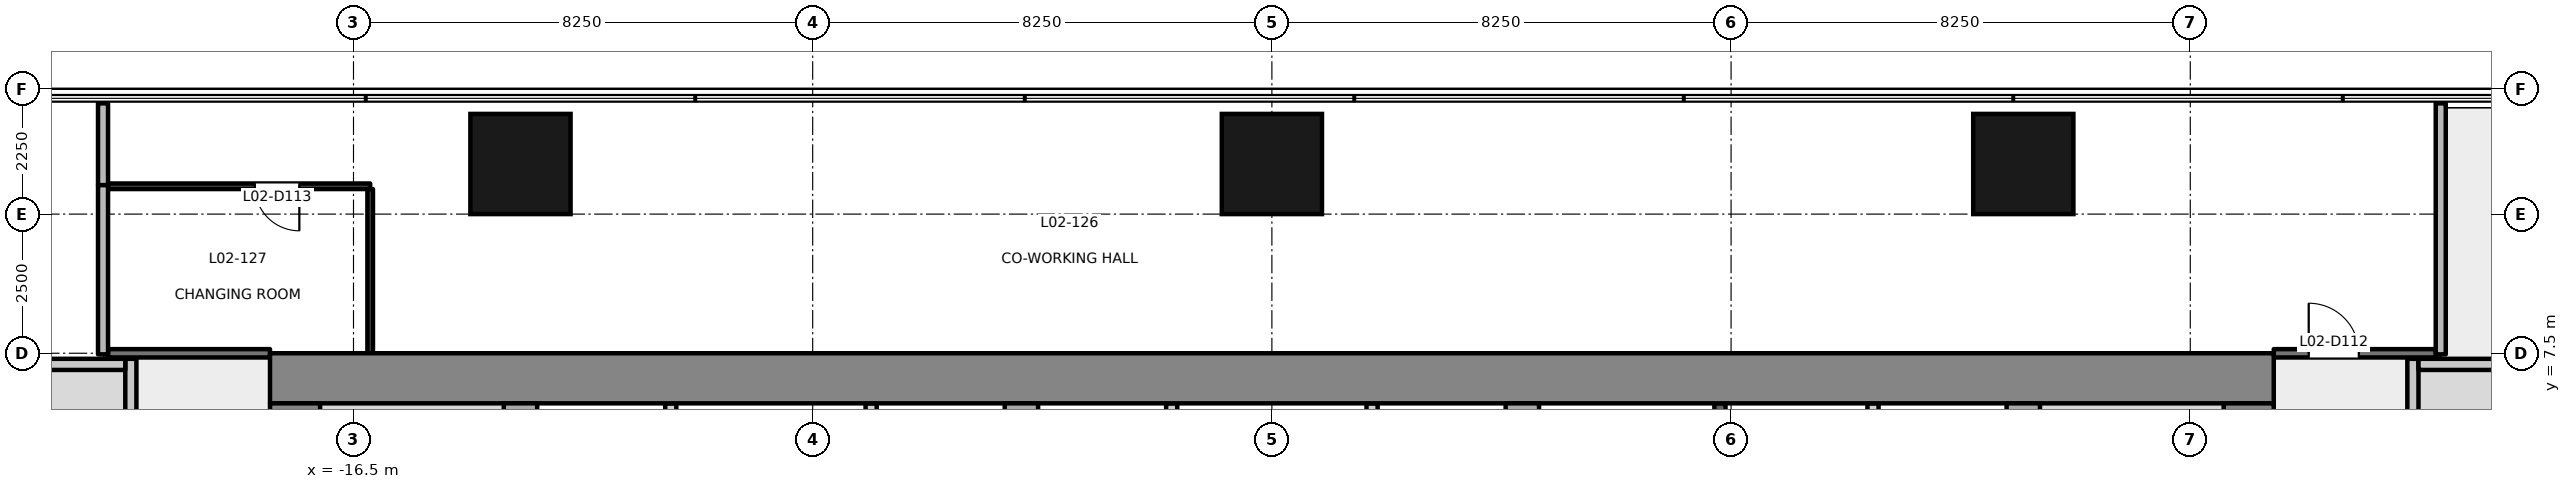
"""IFC4 building model, lengths in metres.
Left out: names, types, materials, properties, quantities, classifications, styles, units other than length and angle.
Written with IfcOpenShell. Run it as: python <this file> out.ifc"""

import sys

from ifc_helpers import new_model, si_unit, direction, frame, frame_2d, origin, origin_2d, place, context, subcontext, project, spatial, rectangle, extrude, element, fill, save


model = new_model("IFC4")
c1 = context("Model", 3, precision=1e-05, world=origin(), true_north=direction((0.0, 1.0)))
c2 = subcontext(c1, "Body", "Model", "MODEL_VIEW")
j1 = project(units=[si_unit("LENGTHUNIT", "METRE"), si_unit("PLANEANGLEUNIT", "RADIAN")], contexts=[c1])
p1 = place(None, origin())
s1 = spatial("IfcSite", under=j1, at=p1, CompositionType="ELEMENT")
p2 = place(p1, origin())
s2 = spatial("IfcBuilding", under=s1, at=p2, CompositionType="ELEMENT")
p3 = place(p2, frame((0.0, 0.0, 12.6)))
s3 = spatial("IfcBuildingStorey", under=s2, at=p3, CompositionType="ELEMENT", Elevation=12.6)
for number, where, z_axis, x_axis in (
    (1, (-13.5, 10.9, -0.2), (0.0, 0.0, 1.0), (1.0, 0.0, 0.0)),
    (2, (0.0, 10.9, -0.2), (0.0, 0.0, 1.0), (1.0, 0.0, 0.0)),
    (3, (13.5, 10.9, -0.2), (0.0, 0.0, 1.0), (1.0, 0.0, 0.0)),
):
    element("IfcColumn", number, at=place(p3, frame(where, z_axis=z_axis, x_axis=x_axis)), inside=s3, PredefinedType="COLUMN", context=c2, shape_type="SweptSolid", body=[
        extrude(rectangle(XDim=1.8, YDim=1.8, at=origin_2d()), origin(), (0.0, 0.0, 1.0), 4.8),
    ])
p4 = place(p3, frame((-18.0, 7.05, -0.2), z_axis=(0.0, 0.0, 1.0), x_axis=(1.0, 0.0, 0.0)))
e4 = element("IfcWall", 4, at=p4, inside=s3, PredefinedType="SHEAR", context=c2, shape_type="SweptSolid", body=[
    extrude(rectangle(XDim=36.0, YDim=0.9, at=frame_2d((18.0, 0.0))), origin(), (0.0, 0.0, 1.0), 4.8),
])
p5 = place(p3, frame((-17.55, -6.6, -0.2), z_axis=(0.0, 0.0, 1.0), x_axis=(0.0, 1.0, 0.0)))
e5 = element("IfcWall", 5, at=p5, inside=s3, PredefinedType="SHEAR", context=c2, shape_type="SweptSolid", body=[
    extrude(rectangle(XDim=13.2, YDim=0.9, at=frame_2d((6.6, 0.0))), origin(), (0.0, 0.0, 1.0), 4.8),
])
p6 = place(p5, frame((4.55, 0.0, 0.2)))
e6 = element("IfcOpeningElement", 6, at=p6, cuts=e5, PredefinedType="OPENING", context=c2, shape_type="SweptSolid", body=[
    extrude(rectangle(XDim=1.2, YDim=2.1, at=frame_2d((0.6, 1.05))), frame((0.0, 0.46, 0.0), z_axis=(0.0, -1.0, 0.0), x_axis=(1.0, 0.0, 0.0)), (0.0, 0.0, 1.0), 0.921),
])
p7 = place(p3, frame((17.55, -6.6, -0.2), z_axis=(0.0, 0.0, 1.0), x_axis=(0.0, 1.0, 0.0)))
e7 = element("IfcWall", 7, at=p7, inside=s3, PredefinedType="SHEAR", context=c2, shape_type="SweptSolid", body=[
    extrude(rectangle(XDim=13.2, YDim=0.9, at=frame_2d((6.6, 0.0))), origin(), (0.0, 0.0, 1.0), 4.8),
])
p8 = place(p7, frame((4.55, 0.0, 0.2)))
e8 = element("IfcOpeningElement", 8, at=p8, cuts=e7, PredefinedType="OPENING", context=c2, shape_type="SweptSolid", body=[
    extrude(rectangle(XDim=1.2, YDim=2.1, at=frame_2d((0.6, 1.05))), frame((0.0, 0.46, 0.0), z_axis=(0.0, -1.0, 0.0), x_axis=(1.0, 0.0, 0.0)), (0.0, 0.0, 1.0), 0.921),
])
for number, where, z_axis, x_axis in (
    (9, (-13.5, -6.6, -0.2), (0.0, 0.0, 1.0), (0.0, 1.0, 0.0)),
    (10, (-4.5, -6.6, -0.2), (0.0, 0.0, 1.0), (0.0, 1.0, 0.0)),
    (11, (4.5, -6.6, -0.2), (0.0, 0.0, 1.0), (0.0, 1.0, 0.0)),
    (12, (13.5, -6.6, -0.2), (0.0, 0.0, 1.0), (0.0, 1.0, 0.0)),
):
    element("IfcWall", number, at=place(p3, frame(where, z_axis=z_axis, x_axis=x_axis)), inside=s3, PredefinedType="SHEAR", context=c2, shape_type="SweptSolid", body=[
        extrude(rectangle(XDim=13.2, YDim=0.6, at=frame_2d((6.6, 0.0))), origin(), (0.0, 0.0, 1.0), 4.8),
    ])
p9 = place(p3, frame((-10.8, -6.6, 0.0), z_axis=(0.0, 0.0, 1.0), x_axis=(0.0, 1.0, 0.0)))
e13 = element("IfcWall", 13, at=p9, inside=s3, PredefinedType="PARTITIONING", context=c2, shape_type="SweptSolid", body=[
    extrude(rectangle(XDim=13.2, YDim=0.2, at=frame_2d((6.6, 0.0))), origin(), (0.0, 0.0, 1.0), 4.6),
])
p10 = place(p9, frame((0.55, 0.0, 0.0)))
e14 = element("IfcOpeningElement", 14, at=p10, cuts=e13, PredefinedType="OPENING", context=c2, shape_type="SweptSolid", body=[
    extrude(rectangle(XDim=0.9, YDim=2.1, at=frame_2d((0.45, 1.05))), frame((0.0, 0.111, 0.0), z_axis=(0.0, -1.0, 0.0), x_axis=(1.0, 0.0, 0.0)), (0.0, 0.0, 1.0), 0.221),
])
p11 = place(p9, frame((2.9, 0.0, 0.0)))
e15 = element("IfcOpeningElement", 15, at=p11, cuts=e13, PredefinedType="OPENING", context=c2, shape_type="SweptSolid", body=[
    extrude(rectangle(XDim=1.2, YDim=2.1, at=frame_2d((0.6, 1.05))), frame((0.0, 0.111, 0.0), z_axis=(0.0, -1.0, 0.0), x_axis=(1.0, 0.0, 0.0)), (0.0, 0.0, 1.0), 0.221),
])
p12 = place(p9, frame((5.7, 0.0, 0.0)))
e16 = element("IfcOpeningElement", 16, at=p12, cuts=e13, PredefinedType="OPENING", context=c2, shape_type="SweptSolid", body=[
    extrude(rectangle(XDim=1.2, YDim=2.1, at=frame_2d((0.6, 1.05))), frame((0.0, 0.111, 0.0), z_axis=(0.0, -1.0, 0.0), x_axis=(1.0, 0.0, 0.0)), (0.0, 0.0, 1.0), 0.221),
])
p13 = place(p9, frame((8.5, 0.0, 0.0)))
e17 = element("IfcOpeningElement", 17, at=p13, cuts=e13, PredefinedType="OPENING", context=c2, shape_type="SweptSolid", body=[
    extrude(rectangle(XDim=1.2, YDim=2.1, at=frame_2d((0.6, 1.05))), frame((0.0, 0.111, 0.0), z_axis=(0.0, -1.0, 0.0), x_axis=(1.0, 0.0, 0.0)), (0.0, 0.0, 1.0), 0.221),
])
p14 = place(p9, frame((11.3, 0.0, 0.0)))
e18 = element("IfcOpeningElement", 18, at=p14, cuts=e13, PredefinedType="OPENING", context=c2, shape_type="SweptSolid", body=[
    extrude(rectangle(XDim=1.2, YDim=2.1, at=frame_2d((0.6, 1.05))), frame((0.0, 0.111, 0.0), z_axis=(0.0, -1.0, 0.0), x_axis=(1.0, 0.0, 0.0)), (0.0, 0.0, 1.0), 0.221),
])
p15 = place(p3, frame((-7.2, -6.6, 0.0), z_axis=(0.0, 0.0, 1.0), x_axis=(0.0, 1.0, 0.0)))
e19 = element("IfcWall", 19, at=p15, inside=s3, PredefinedType="PARTITIONING", context=c2, shape_type="SweptSolid", body=[
    extrude(rectangle(XDim=13.2, YDim=0.2, at=frame_2d((6.6, 0.0))), origin(), (0.0, 0.0, 1.0), 4.6),
])
p16 = place(p15, frame((0.55, 0.0, 0.0)))
e20 = element("IfcOpeningElement", 20, at=p16, cuts=e19, PredefinedType="OPENING", context=c2, shape_type="SweptSolid", body=[
    extrude(rectangle(XDim=0.9, YDim=2.1, at=frame_2d((0.45, 1.05))), frame((0.0, 0.111, 0.0), z_axis=(0.0, -1.0, 0.0), x_axis=(1.0, 0.0, 0.0)), (0.0, 0.0, 1.0), 0.221),
])
p17 = place(p15, frame((2.9, 0.0, 0.0)))
e21 = element("IfcOpeningElement", 21, at=p17, cuts=e19, PredefinedType="OPENING", context=c2, shape_type="SweptSolid", body=[
    extrude(rectangle(XDim=1.2, YDim=2.1, at=frame_2d((0.6, 1.05))), frame((0.0, 0.111, 0.0), z_axis=(0.0, -1.0, 0.0), x_axis=(1.0, 0.0, 0.0)), (0.0, 0.0, 1.0), 0.221),
])
p18 = place(p15, frame((5.7, 0.0, 0.0)))
e22 = element("IfcOpeningElement", 22, at=p18, cuts=e19, PredefinedType="OPENING", context=c2, shape_type="SweptSolid", body=[
    extrude(rectangle(XDim=1.2, YDim=2.1, at=frame_2d((0.6, 1.05))), frame((0.0, 0.111, 0.0), z_axis=(0.0, -1.0, 0.0), x_axis=(1.0, 0.0, 0.0)), (0.0, 0.0, 1.0), 0.221),
])
p19 = place(p15, frame((8.5, 0.0, 0.0)))
e23 = element("IfcOpeningElement", 23, at=p19, cuts=e19, PredefinedType="OPENING", context=c2, shape_type="SweptSolid", body=[
    extrude(rectangle(XDim=1.2, YDim=2.1, at=frame_2d((0.6, 1.05))), frame((0.0, 0.111, 0.0), z_axis=(0.0, -1.0, 0.0), x_axis=(1.0, 0.0, 0.0)), (0.0, 0.0, 1.0), 0.221),
])
p20 = place(p15, frame((11.3, 0.0, 0.0)))
e24 = element("IfcOpeningElement", 24, at=p20, cuts=e19, PredefinedType="OPENING", context=c2, shape_type="SweptSolid", body=[
    extrude(rectangle(XDim=1.2, YDim=2.1, at=frame_2d((0.6, 1.05))), frame((0.0, 0.111, 0.0), z_axis=(0.0, -1.0, 0.0), x_axis=(1.0, 0.0, 0.0)), (0.0, 0.0, 1.0), 0.221),
])
p21 = place(p3, frame((-1.8, -6.6, 0.0), z_axis=(0.0, 0.0, 1.0), x_axis=(0.0, 1.0, 0.0)))
e25 = element("IfcWall", 25, at=p21, inside=s3, PredefinedType="PARTITIONING", context=c2, shape_type="SweptSolid", body=[
    extrude(rectangle(XDim=13.2, YDim=0.2, at=frame_2d((6.6, 0.0))), origin(), (0.0, 0.0, 1.0), 4.6),
])
p22 = place(p21, frame((0.55, 0.0, 0.0)))
e26 = element("IfcOpeningElement", 26, at=p22, cuts=e25, PredefinedType="OPENING", context=c2, shape_type="SweptSolid", body=[
    extrude(rectangle(XDim=0.9, YDim=2.1, at=frame_2d((0.45, 1.05))), frame((0.0, 0.111, 0.0), z_axis=(0.0, -1.0, 0.0), x_axis=(1.0, 0.0, 0.0)), (0.0, 0.0, 1.0), 0.221),
])
p23 = place(p3, frame((1.8, -6.6, 0.0), z_axis=(0.0, 0.0, 1.0), x_axis=(0.0, 1.0, 0.0)))
e27 = element("IfcWall", 27, at=p23, inside=s3, PredefinedType="PARTITIONING", context=c2, shape_type="SweptSolid", body=[
    extrude(rectangle(XDim=13.2, YDim=0.2, at=frame_2d((6.6, 0.0))), origin(), (0.0, 0.0, 1.0), 4.6),
])
p24 = place(p23, frame((0.55, 0.0, 0.0)))
e28 = element("IfcOpeningElement", 28, at=p24, cuts=e27, PredefinedType="OPENING", context=c2, shape_type="SweptSolid", body=[
    extrude(rectangle(XDim=0.9, YDim=2.1, at=frame_2d((0.45, 1.05))), frame((0.0, 0.111, 0.0), z_axis=(0.0, -1.0, 0.0), x_axis=(1.0, 0.0, 0.0)), (0.0, 0.0, 1.0), 0.221),
])
p25 = place(p3, frame((8.05, -6.6, 0.0), z_axis=(0.0, 0.0, 1.0), x_axis=(0.0, 1.0, 0.0)))
e29 = element("IfcWall", 29, at=p25, inside=s3, PredefinedType="PARTITIONING", context=c2, shape_type="SweptSolid", body=[
    extrude(rectangle(XDim=13.2, YDim=0.2, at=frame_2d((6.6, 0.0))), origin(), (0.0, 0.0, 1.0), 4.6),
])
p26 = place(p25, frame((1.386, 0.0, 0.0)))
e30 = element("IfcOpeningElement", 30, at=p26, cuts=e29, PredefinedType="OPENING", context=c2, shape_type="SweptSolid", body=[
    extrude(rectangle(XDim=0.9, YDim=2.1, at=frame_2d((0.45, 1.05))), frame((0.0, 0.111, 0.0), z_axis=(0.0, -1.0, 0.0), x_axis=(1.0, 0.0, 0.0)), (0.0, 0.0, 1.0), 0.221),
])
p27 = place(p25, frame((4.786, 0.0, 0.0)))
e31 = element("IfcOpeningElement", 31, at=p27, cuts=e29, PredefinedType="OPENING", context=c2, shape_type="SweptSolid", body=[
    extrude(rectangle(XDim=0.9, YDim=2.1, at=frame_2d((0.45, 1.05))), frame((0.0, 0.111, 0.0), z_axis=(0.0, -1.0, 0.0), x_axis=(1.0, 0.0, 0.0)), (0.0, 0.0, 1.0), 0.221),
])
p28 = place(p25, frame((11.9, 0.0, 0.0)))
e32 = element("IfcOpeningElement", 32, at=p28, cuts=e29, PredefinedType="OPENING", context=c2, shape_type="SweptSolid", body=[
    extrude(rectangle(XDim=1.1, YDim=2.1, at=frame_2d((0.55, 1.05))), frame((0.0, 0.111, 0.0), z_axis=(0.0, -1.0, 0.0), x_axis=(1.0, 0.0, 0.0)), (0.0, 0.0, 1.0), 0.221),
])
p29 = place(p3, frame((10.8, -6.6, 0.0), z_axis=(0.0, 0.0, 1.0), x_axis=(0.0, 1.0, 0.0)))
e33 = element("IfcWall", 33, at=p29, inside=s3, PredefinedType="PARTITIONING", context=c2, shape_type="SweptSolid", body=[
    extrude(rectangle(XDim=13.2, YDim=0.2, at=frame_2d((6.6, 0.0))), origin(), (0.0, 0.0, 1.0), 4.6),
])
p30 = place(p29, frame((0.7, 0.0, 0.0)))
e34 = element("IfcOpeningElement", 34, at=p30, cuts=e33, PredefinedType="OPENING", context=c2, shape_type="SweptSolid", body=[
    extrude(rectangle(XDim=1.2, YDim=2.1, at=frame_2d((0.6, 1.05))), frame((0.0, 0.111, 0.0), z_axis=(0.0, -1.0, 0.0), x_axis=(1.0, 0.0, 0.0)), (0.0, 0.0, 1.0), 0.221),
])
p31 = place(p29, frame((8.742, 0.0, 0.0)))
e35 = element("IfcOpeningElement", 35, at=p31, cuts=e33, PredefinedType="OPENING", context=c2, shape_type="SweptSolid", body=[
    extrude(rectangle(XDim=0.9, YDim=2.1, at=frame_2d((0.45, 1.05))), frame((0.0, 0.111, 0.0), z_axis=(0.0, -1.0, 0.0), x_axis=(1.0, 0.0, 0.0)), (0.0, 0.0, 1.0), 0.221),
])
p32 = place(p29, frame((10.326, 0.0, 0.0)))
e36 = element("IfcOpeningElement", 36, at=p32, cuts=e33, PredefinedType="OPENING", context=c2, shape_type="SweptSolid", body=[
    extrude(rectangle(XDim=0.9, YDim=2.1, at=frame_2d((0.45, 1.05))), frame((0.0, 0.111, 0.0), z_axis=(0.0, -1.0, 0.0), x_axis=(1.0, 0.0, 0.0)), (0.0, 0.0, 1.0), 0.221),
])
p33 = place(p29, frame((11.934, 0.0, 0.0)))
e37 = element("IfcOpeningElement", 37, at=p33, cuts=e33, PredefinedType="OPENING", context=c2, shape_type="SweptSolid", body=[
    extrude(rectangle(XDim=0.9, YDim=2.1, at=frame_2d((0.45, 1.05))), frame((0.0, 0.111, 0.0), z_axis=(0.0, -1.0, 0.0), x_axis=(1.0, 0.0, 0.0)), (0.0, 0.0, 1.0), 0.221),
])
p34 = place(p3, frame((-20.5, 7.4, -0.2), z_axis=(0.0, 0.0, 1.0), x_axis=(0.0, -1.0, 0.0)))
e38 = element("IfcWall", 38, at=p34, inside=s3, PredefinedType="SHEAR", context=c2, shape_type="SweptSolid", body=[
    extrude(rectangle(XDim=7.4, YDim=0.2, at=frame_2d((3.7, 0.0))), origin(), (0.0, 0.0, 1.0), 4.8),
])
p35 = place(p34, frame((5.375, 0.0, 0.2)))
e39 = element("IfcOpeningElement", 39, at=p35, cuts=e38, PredefinedType="OPENING", context=c2, shape_type="SweptSolid", body=[
    extrude(rectangle(XDim=1.8, YDim=2.1, at=frame_2d((0.9, 1.05))), frame((0.0, 0.111, 0.0), z_axis=(0.0, -1.0, 0.0), x_axis=(1.0, 0.0, 0.0)), (0.0, 0.0, 1.0), 0.221),
])
p36 = place(p3, frame((-25.1, 7.3, -0.2), z_axis=(0.0, 0.0, 1.0), x_axis=(1.0, 0.0, 0.0)))
e40 = element("IfcWall", 40, at=p36, inside=s3, PredefinedType="SHEAR", context=c2, shape_type="SweptSolid", body=[
    extrude(rectangle(XDim=4.5, YDim=0.2, at=frame_2d((2.25, 0.0))), origin(), (0.0, 0.0, 1.0), 4.8),
])
p37 = place(p3, frame((20.5, 0.0, -0.2), z_axis=(0.0, 0.0, 1.0), x_axis=(0.0, 1.0, 0.0)))
e41 = element("IfcWall", 41, at=p37, inside=s3, PredefinedType="SHEAR", context=c2, shape_type="SweptSolid", body=[
    extrude(rectangle(XDim=7.4, YDim=0.2, at=frame_2d((3.7, 0.0))), origin(), (0.0, 0.0, 1.0), 4.8),
])
p38 = place(p37, frame((0.225, 0.0, 0.2)))
e42 = element("IfcOpeningElement", 42, at=p38, cuts=e41, PredefinedType="OPENING", context=c2, shape_type="SweptSolid", body=[
    extrude(rectangle(XDim=1.8, YDim=2.1, at=frame_2d((0.9, 1.05))), frame((0.0, 0.111, 0.0), z_axis=(0.0, -1.0, 0.0), x_axis=(1.0, 0.0, 0.0)), (0.0, 0.0, 1.0), 0.221),
])
p39 = place(p3, frame((20.6, 7.3, -0.2), z_axis=(0.0, 0.0, 1.0), x_axis=(1.0, 0.0, 0.0)))
e43 = element("IfcWall", 43, at=p39, inside=s3, PredefinedType="SHEAR", context=c2, shape_type="SweptSolid", body=[
    extrude(rectangle(XDim=4.5, YDim=0.2, at=frame_2d((2.25, 0.0))), origin(), (0.0, 0.0, 1.0), 4.8),
])
p40 = place(p3, frame((18.0, 7.499, 0.0), z_axis=(0.0, 0.0, 1.0), x_axis=(1.0, 0.0, 0.0)))
e44 = element("IfcWall", 44, at=p40, inside=s3, PredefinedType="PARTITIONING", context=c2, shape_type="SweptSolid", body=[
    extrude(rectangle(XDim=2.91, YDim=0.15, at=frame_2d((1.455, 0.0))), origin(), (0.0, 0.0, 1.0), 4.3),
])
p41 = place(p40, frame((0.628, 0.0, 0.0)))
e45 = element("IfcOpeningElement", 45, at=p41, cuts=e44, PredefinedType="OPENING", context=c2, shape_type="SweptSolid", body=[
    extrude(rectangle(XDim=0.9, YDim=2.1, at=frame_2d((0.45, 1.05))), frame((0.0, 0.085, 0.0), z_axis=(0.0, -1.0, 0.0), x_axis=(1.0, 0.0, 0.0)), (0.0, 0.0, 1.0), 0.171),
])
p42 = place(p3, frame((-20.91, 7.499, 0.0), z_axis=(0.0, 0.0, 1.0), x_axis=(1.0, 0.0, 0.0)))
e46 = element("IfcWall", 46, at=p42, inside=s3, PredefinedType="PARTITIONING", context=c2, shape_type="SweptSolid", body=[
    extrude(rectangle(XDim=2.91, YDim=0.15, at=frame_2d((1.455, 0.0))), origin(), (0.0, 0.0, 1.0), 4.3),
])
p43 = place(p3, frame((-21.0, 11.99, 0.0), z_axis=(0.0, 0.0, 1.0), x_axis=(0.0, -1.0, 0.0)))
e47 = element("IfcWall", 47, at=p43, inside=s3, PredefinedType="PARTITIONING", context=c2, shape_type="SweptSolid", body=[
    extrude(rectangle(XDim=1.47, YDim=0.18, at=frame_2d((0.735, 0.0))), origin(), (0.0, 0.0, 1.0), 3.6),
])
p44 = place(p3, frame((-21.0, 10.52, 0.0), z_axis=(0.0, 0.0, 1.0), x_axis=(0.0, -1.0, 0.0)))
e48 = element("IfcWall", 48, at=p44, inside=s3, PredefinedType="PARTITIONING", context=c2, shape_type="SweptSolid", body=[
    extrude(rectangle(XDim=3.04, YDim=0.18, at=frame_2d((1.52, 0.0))), origin(), (0.0, 0.0, 1.0), 4.6),
])
p45 = place(p3, frame((21.0, 7.48, 0.0), z_axis=(0.0, 0.0, 1.0), x_axis=(0.0, 1.0, 0.0)))
e49 = element("IfcWall", 49, at=p45, inside=s3, PredefinedType="PARTITIONING", context=c2, shape_type="SweptSolid", body=[
    extrude(rectangle(XDim=4.51, YDim=0.18, at=frame_2d((2.255, 0.0))), origin(), (0.0, 0.0, 1.0), 3.6),
])
p46 = place(p3, frame((-16.2, 10.5, 0.0), z_axis=(0.0, 0.0, 1.0), x_axis=(-1.0, 0.0, 0.0)))
e50 = element("IfcWall", 50, at=p46, inside=s3, PredefinedType="PARTITIONING", context=c2, shape_type="SweptSolid", body=[
    extrude(rectangle(XDim=4.71, YDim=0.1, at=frame_2d((2.355, 0.0))), origin(), (0.0, 0.0, 1.0), 4.3),
])
p47 = place(p46, frame((1.273, 0.0, 0.0)))
e51 = element("IfcOpeningElement", 51, at=p47, cuts=e50, PredefinedType="OPENING", context=c2, shape_type="SweptSolid", body=[
    extrude(rectangle(XDim=0.8, YDim=2.1, at=frame_2d((0.4, 1.05))), frame((0.0, 0.061, 0.0), z_axis=(0.0, -1.0, 0.0), x_axis=(1.0, 0.0, 0.0)), (0.0, 0.0, 1.0), 0.121),
])
p48 = place(p3, frame((-16.2, 7.5, 0.0), z_axis=(0.0, 0.0, 1.0), x_axis=(0.0, 1.0, 0.0)))
e52 = element("IfcWall", 52, at=p48, inside=s3, PredefinedType="PARTITIONING", context=c2, shape_type="SweptSolid", body=[
    extrude(rectangle(XDim=2.95, YDim=0.1, at=frame_2d((1.475, 0.0))), origin(), (0.0, 0.0, 1.0), 4.6),
])
p49 = place(p41, origin())
e53 = element("IfcDoor", 53, at=p49, inside=s3, OperationType="SINGLE_SWING_LEFT", PredefinedType="DOOR", context=c2, shape_type="SweptSolid", body=[
    extrude(rectangle(XDim=0.9, YDim=2.1, at=frame_2d((0.45, 1.05))), frame((0.0, 0.025, 0.0), z_axis=(0.0, -1.0, 0.0), x_axis=(1.0, 0.0, 0.0)), (0.0, 0.0, 1.0), 0.05),
])
fill(e45, e53)
p50 = place(p47, origin())
e54 = element("IfcDoor", 54, at=p50, inside=s3, OperationType="SINGLE_SWING_LEFT", PredefinedType="DOOR", context=c2, shape_type="SweptSolid", body=[
    extrude(rectangle(XDim=0.8, YDim=2.1, at=frame_2d((0.4, 1.05))), frame((0.0, 0.025, 0.0), z_axis=(0.0, -1.0, 0.0), x_axis=(1.0, 0.0, 0.0)), (0.0, 0.0, 1.0), 0.05),
])
fill(e51, e54)
save(model, sys.argv[1])
